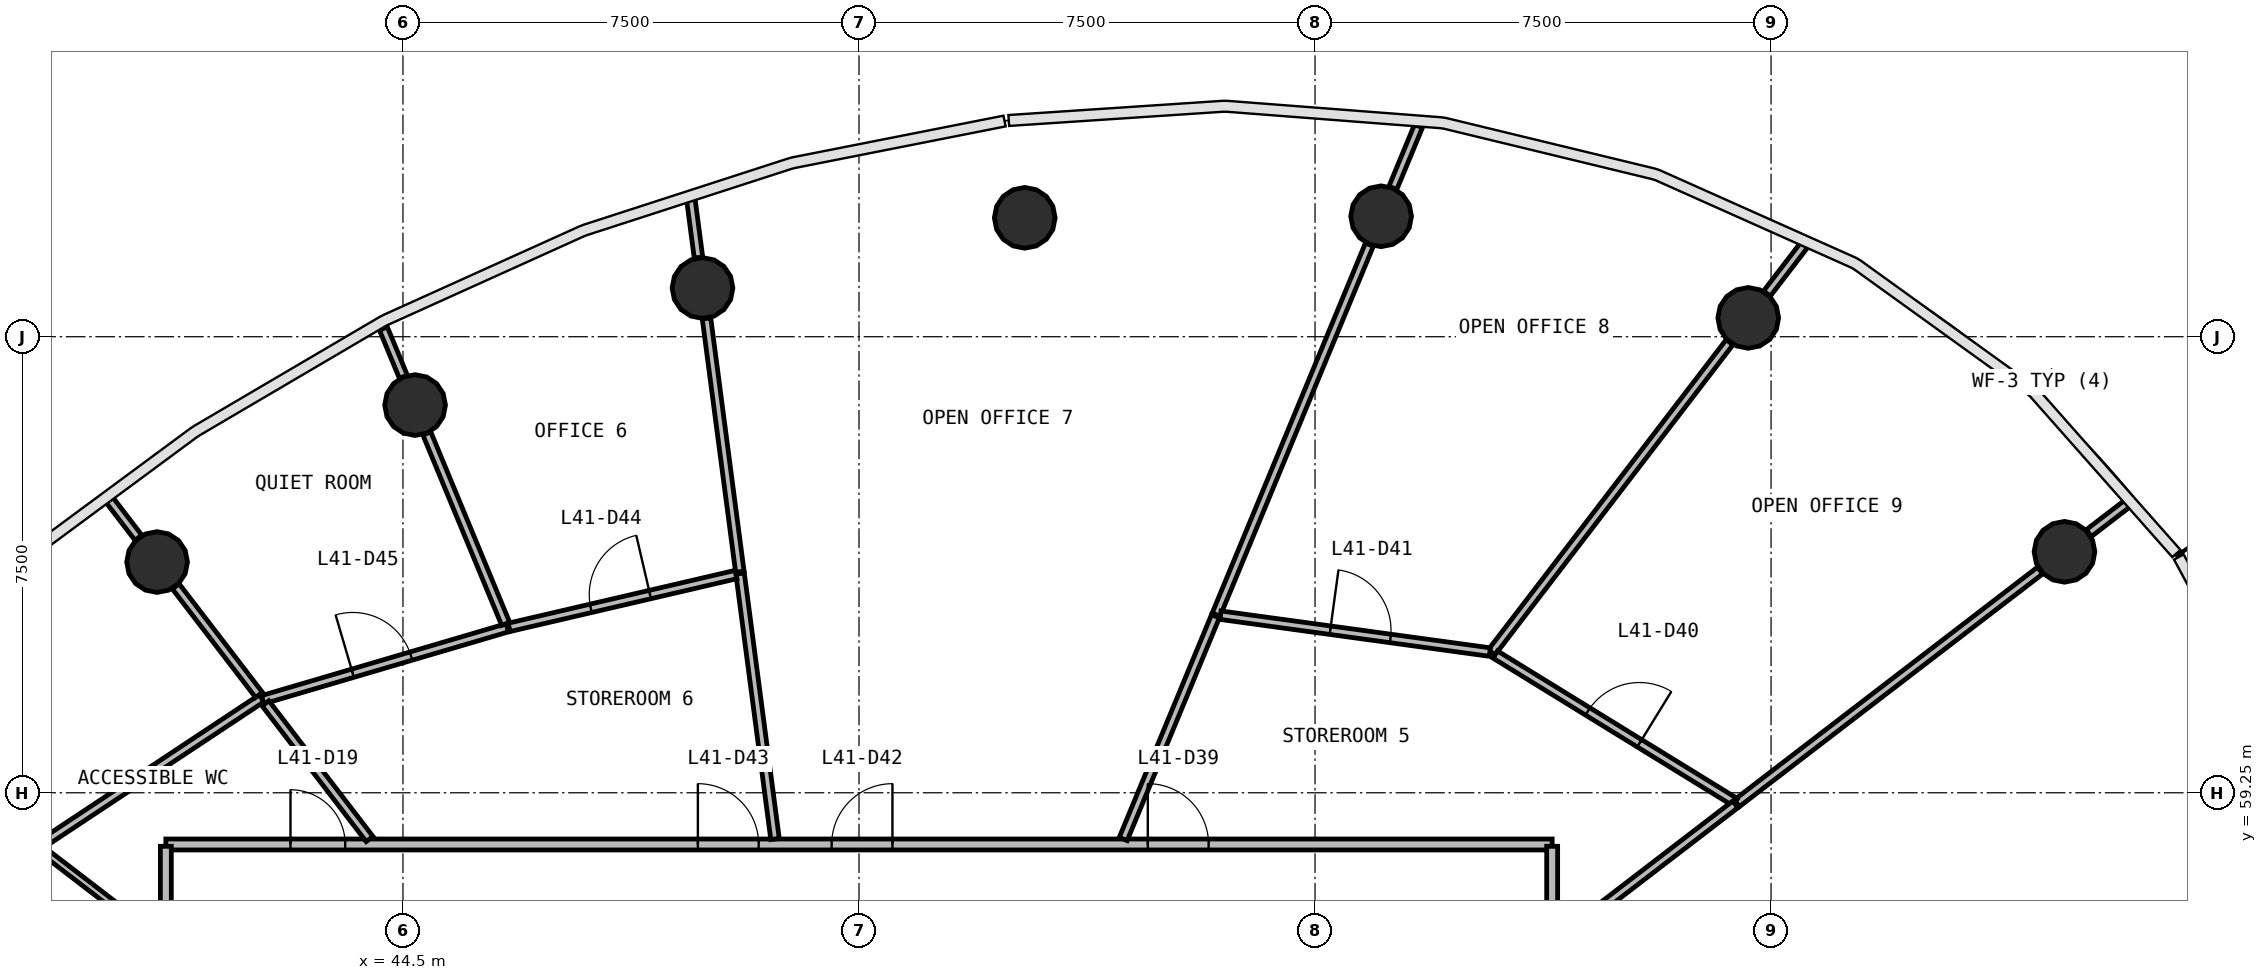
"""IFC4 building model, lengths in metres.
Left out: names, types, materials, properties, quantities, classifications, styles, units other than length and angle.
Written with IfcOpenShell. Run it as: python <this file> out.ifc"""

import sys

from ifc_helpers import new_model, si_unit, direction, frame, frame_2d, origin, origin_2d, place, context, subcontext, project, spatial, rectangle, circle, extrude, source, transform, mapped, element, fill, save


model = new_model("IFC4")
c1 = context("Model", 3, precision=1e-05, world=origin(), true_north=direction((0.0, 1.0)))
c2 = subcontext(c1, "Body", "Model", "MODEL_VIEW")
j1 = project(units=[si_unit("LENGTHUNIT", "METRE"), si_unit("PLANEANGLEUNIT", "RADIAN")], contexts=[c1])
p1 = place(None, origin())
s1 = spatial("IfcSite", under=j1, at=p1, CompositionType="ELEMENT")
p2 = place(p1, origin())
s2 = spatial("IfcBuilding", under=s1, at=p2, CompositionType="ELEMENT")
p3 = place(p2, frame((0.0, 0.0, 172.1)))
s3 = spatial("IfcBuildingStorey", under=s2, at=p3, CompositionType="ELEMENT", Elevation=172.1)
m1 = source(origin(), c2, "Body", "SweptSolid", [
    extrude(circle(Radius=0.5, at=origin_2d()), origin(), (0.0, 0.0, 1.0), 3.9),
])
for number, where, z_axis, x_axis in (
    (1, (71.826, 63.213, 0.0), (0.0, 0.0, 1.0), (1.0, 0.0, 0.0)),
    (2, (66.625, 67.06, 0.0), (0.0, 0.0, 1.0), (1.0, 0.0, 0.0)),
    (3, (60.587, 68.731, 0.0), (0.0, 0.0, 1.0), (1.0, 0.0, 0.0)),
    (4, (54.726, 68.705, 0.0), (0.0, 0.0, 1.0), (1.0, 0.0, 0.0)),
    (5, (49.426, 67.551, 0.0), (0.0, 0.0, 1.0), (1.0, 0.0, 0.0)),
    (6, (44.699, 65.626, 0.0), (0.0, 0.0, 1.0), (1.0, 0.0, 0.0)),
    (7, (40.456, 63.044, 0.0), (0.0, 0.0, 1.0), (1.0, 0.0, 0.0)),
):
    element("IfcColumn", number, at=place(p3, frame(where, z_axis=z_axis, x_axis=x_axis)), inside=s3, PredefinedType="COLUMN", context=c2, shape_type="MappedRepresentation", body=[
        mapped(m1, transform((0.0, 0.0, 0.0), scale=1.0)),
    ])
p4 = place(p3, frame((40.6, 58.4, 0.0), z_axis=(0.0, 0.0, 1.0), x_axis=(1.0, 0.0, 0.0)))
e8 = element("IfcWall", 8, at=p4, inside=s3, PredefinedType="PARTITIONING", context=c2, shape_type="SweptSolid", body=[
    extrude(rectangle(XDim=22.8, YDim=0.18, at=frame_2d((11.4, 0.0))), origin(), (0.0, 0.0, 1.0), 2.88),
])
p5 = place(p4, frame((2.05, 0.0, 0.0)))
e9 = element("IfcOpeningElement", 9, at=p5, cuts=e8, PredefinedType="OPENING", context=c2, shape_type="SweptSolid", body=[
    extrude(rectangle(XDim=0.9, YDim=2.1, at=frame_2d((0.45, 1.05))), frame((0.0, 0.1, 0.0), z_axis=(0.0, -1.0, 0.0), x_axis=(1.0, 0.0, 0.0)), (0.0, 0.0, 1.0), 0.2),
])
p6 = place(p4, frame((16.15, 0.0, 0.0)))
e10 = element("IfcOpeningElement", 10, at=p6, cuts=e8, PredefinedType="OPENING", context=c2, shape_type="SweptSolid", body=[
    extrude(rectangle(XDim=1.0, YDim=2.1, at=frame_2d((0.5, 1.05))), frame((0.0, 0.1, 0.0), z_axis=(0.0, -1.0, 0.0), x_axis=(1.0, 0.0, 0.0)), (0.0, 0.0, 1.0), 0.2),
])
p7 = place(p4, frame((10.95, 0.0, 0.0)))
e11 = element("IfcOpeningElement", 11, at=p7, cuts=e8, PredefinedType="OPENING", context=c2, shape_type="SweptSolid", body=[
    extrude(rectangle(XDim=1.0, YDim=2.1, at=frame_2d((0.5, 1.05))), frame((0.0, 0.1, 0.0), z_axis=(0.0, -1.0, 0.0), x_axis=(1.0, 0.0, 0.0)), (0.0, 0.0, 1.0), 0.2),
])
p8 = place(p4, frame((8.75, 0.0, 0.0)))
e12 = element("IfcOpeningElement", 12, at=p8, cuts=e8, PredefinedType="OPENING", context=c2, shape_type="SweptSolid", body=[
    extrude(rectangle(XDim=1.0, YDim=2.1, at=frame_2d((0.5, 1.05))), frame((0.0, 0.1, 0.0), z_axis=(0.0, -1.0, 0.0), x_axis=(1.0, 0.0, 0.0)), (0.0, 0.0, 1.0), 0.2),
])
p9 = place(p3, frame((63.4, 58.37, 0.0), z_axis=(0.0, 0.0, 1.0), x_axis=(0.0, -1.0, 0.0)))
e13 = element("IfcWall", 13, at=p9, inside=s3, PredefinedType="PARTITIONING", context=c2, shape_type="SweptSolid", body=[
    extrude(rectangle(XDim=20.74, YDim=0.18, at=frame_2d((10.37, 0.0))), origin(), (0.0, 0.0, 1.0), 2.88),
])
p10 = place(p9, frame((15.49, 0.0, 0.0)))
e14 = element("IfcOpeningElement", 14, at=p10, cuts=e13, PredefinedType="OPENING", context=c2, shape_type="SweptSolid", body=[
    extrude(rectangle(XDim=1.0, YDim=2.1, at=frame_2d((0.5, 1.05))), frame((0.0, 0.1, 0.0), z_axis=(0.0, -1.0, 0.0), x_axis=(1.0, 0.0, 0.0)), (0.0, 0.0, 1.0), 0.2),
])
p11 = place(p9, frame((9.89, 0.0, 0.0)))
e15 = element("IfcOpeningElement", 15, at=p11, cuts=e13, PredefinedType="OPENING", context=c2, shape_type="SweptSolid", body=[
    extrude(rectangle(XDim=1.0, YDim=2.1, at=frame_2d((0.5, 1.05))), frame((0.0, 0.1, 0.0), z_axis=(0.0, -1.0, 0.0), x_axis=(1.0, 0.0, 0.0)), (0.0, 0.0, 1.0), 0.2),
])
p12 = place(p9, frame((7.69, 0.0, 0.0)))
e16 = element("IfcOpeningElement", 16, at=p12, cuts=e13, PredefinedType="OPENING", context=c2, shape_type="SweptSolid", body=[
    extrude(rectangle(XDim=1.0, YDim=2.1, at=frame_2d((0.5, 1.05))), frame((0.0, 0.1, 0.0), z_axis=(0.0, -1.0, 0.0), x_axis=(1.0, 0.0, 0.0)), (0.0, 0.0, 1.0), 0.2),
])
p13 = place(p3, frame((40.6, 37.63, 0.0), z_axis=(0.0, 0.0, 1.0), x_axis=(0.0, 1.0, 0.0)))
e17 = element("IfcWall", 17, at=p13, inside=s3, PredefinedType="PARTITIONING", context=c2, shape_type="SweptSolid", body=[
    extrude(rectangle(XDim=20.74, YDim=0.18, at=frame_2d((10.37, 0.0))), origin(), (0.0, 0.0, 1.0), 2.88),
])
p14 = place(p13, frame((15.39, 0.0, 0.0)))
e18 = element("IfcOpeningElement", 18, at=p14, cuts=e17, PredefinedType="OPENING", context=c2, shape_type="SweptSolid", body=[
    extrude(rectangle(XDim=0.9, YDim=2.1, at=frame_2d((0.45, 1.05))), frame((0.0, 0.1, 0.0), z_axis=(0.0, -1.0, 0.0), x_axis=(1.0, 0.0, 0.0)), (0.0, 0.0, 1.0), 0.2),
])
p15 = place(p13, frame((9.89, 0.0, 0.0)))
e19 = element("IfcOpeningElement", 19, at=p15, cuts=e17, PredefinedType="OPENING", context=c2, shape_type="SweptSolid", body=[
    extrude(rectangle(XDim=1.0, YDim=2.1, at=frame_2d((0.5, 1.05))), frame((0.0, 0.1, 0.0), z_axis=(0.0, -1.0, 0.0), x_axis=(1.0, 0.0, 0.0)), (0.0, 0.0, 1.0), 0.2),
])
p16 = place(p3, frame((57.874, 62.18, 0.0), z_axis=(0.0, 0.0, 1.0), x_axis=(0.382677040964, 0.92388217989, 0.0)))
e20 = element("IfcWall", 20, at=p16, inside=s3, PredefinedType="PARTITIONING", context=c2, shape_type="SweptSolid", body=[
    extrude(rectangle(XDim=6.585, YDim=0.14, at=frame_2d((3.292, 0.0))), origin(), (0.0, 0.0, 1.0), 2.88),
])
p17 = place(p3, frame((62.405, 61.56, 0.0), z_axis=(0.0, 0.0, 1.0), x_axis=(0.608781538985, 0.793337908958, 0.0)))
e21 = element("IfcWall", 21, at=p17, inside=s3, PredefinedType="PARTITIONING", context=c2, shape_type="SweptSolid", body=[
    extrude(rectangle(XDim=6.428, YDim=0.14, at=frame_2d((3.214, 0.0))), origin(), (0.0, 0.0, 1.0), 2.88),
])
p18 = place(p3, frame((66.437, 59.078, 0.0), z_axis=(0.0, 0.0, 1.0), x_axis=(0.793368198418, 0.608742065032, 0.0)))
e22 = element("IfcWall", 22, at=p18, inside=s3, PredefinedType="PARTITIONING", context=c2, shape_type="SweptSolid", body=[
    extrude(rectangle(XDim=6.288, YDim=0.14, at=frame_2d((3.144, 0.0))), origin(), (0.0, 0.0, 1.0), 2.88),
])
p19 = place(p3, frame((62.465, 61.523, 0.0), z_axis=(0.0, 0.0, 1.0), x_axis=(0.851618521929, -0.524162086675, 0.0)))
e23 = element("IfcWall", 23, at=p19, inside=s3, PredefinedType="PARTITIONING", context=c2, shape_type="SweptSolid", body=[
    extrude(rectangle(XDim=4.635, YDim=0.14, at=frame_2d((2.317, 0.0))), origin(), (0.0, 0.0, 1.0), 2.88),
])
p20 = place(p19, frame((1.785, 0.0, 0.0)))
e24 = element("IfcOpeningElement", 24, at=p20, cuts=e23, PredefinedType="OPENING", context=c2, shape_type="SweptSolid", body=[
    extrude(rectangle(XDim=1.0, YDim=2.1, at=frame_2d((0.5, 1.05))), frame((0.0, 0.08, 0.0), z_axis=(0.0, -1.0, 0.0), x_axis=(1.0, 0.0, 0.0)), (0.0, 0.0, 1.0), 0.16),
])
p21 = place(p3, frame((57.946, 62.171, 0.0), z_axis=(0.0, 0.0, 1.0), x_axis=(0.990750915394, -0.135693123057, 0.0)))
e25 = element("IfcWall", 25, at=p21, inside=s3, PredefinedType="PARTITIONING", context=c2, shape_type="SweptSolid", body=[
    extrude(rectangle(XDim=4.471, YDim=0.14, at=frame_2d((2.235, 0.0))), origin(), (0.0, 0.0, 1.0), 2.88),
])
p22 = place(p21, frame((1.821, 0.0, 0.0)))
e26 = element("IfcOpeningElement", 26, at=p22, cuts=e25, PredefinedType="OPENING", context=c2, shape_type="SweptSolid", body=[
    extrude(rectangle(XDim=1.0, YDim=2.1, at=frame_2d((0.5, 1.05))), frame((0.0, 0.08, 0.0), z_axis=(0.0, -1.0, 0.0), x_axis=(1.0, 0.0, 0.0)), (0.0, 0.0, 1.0), 0.16),
])
p23 = place(p3, frame((50.619, 58.49, 0.0), z_axis=(0.0, 0.0, 1.0), x_axis=(-0.130550630931, 0.99144164365, 0.0)))
e27 = element("IfcWall", 27, at=p23, inside=s3, PredefinedType="PARTITIONING", context=c2, shape_type="SweptSolid", body=[
    extrude(rectangle(XDim=4.402, YDim=0.14, at=frame_2d((2.201, 0.0))), origin(), (0.0, 0.0, 1.0), 2.88),
])
p24 = place(p3, frame((42.175, 60.804, 0.0), z_axis=(0.0, 0.0, 1.0), x_axis=(-0.833696109899, -0.552223502162, 0.0)))
e28 = element("IfcWall", 28, at=p24, inside=s3, PredefinedType="PARTITIONING", context=c2, shape_type="SweptSolid", body=[
    extrude(rectangle(XDim=4.417, YDim=0.14, at=frame_2d((2.209, 0.0))), origin(), (0.0, 0.0, 1.0), 2.88),
])
p25 = place(p3, frame((50.04, 62.885, 0.0), z_axis=(0.0, 0.0, 1.0), x_axis=(-0.130474047821, 0.991451724919, 0.0)))
e29 = element("IfcWall", 29, at=p25, inside=s3, PredefinedType="PARTITIONING", context=c2, shape_type="SweptSolid", body=[
    extrude(rectangle(XDim=4.203, YDim=0.14, at=frame_2d((2.101, 0.0))), origin(), (0.0, 0.0, 1.0), 2.88),
])
p26 = place(p3, frame((42.193, 60.781, 0.0), z_axis=(0.0, 0.0, 1.0), x_axis=(0.959388676041, 0.282087518838, 0.0)))
e30 = element("IfcWall", 30, at=p26, inside=s3, PredefinedType="PARTITIONING", context=c2, shape_type="SweptSolid", body=[
    extrude(rectangle(XDim=4.193, YDim=0.14, at=frame_2d((2.097, 0.0))), origin(), (0.0, 0.0, 1.0), 2.88),
])
p27 = place(p26, frame((1.543, 0.0, 0.0)))
e31 = element("IfcOpeningElement", 31, at=p27, cuts=e30, PredefinedType="OPENING", context=c2, shape_type="SweptSolid", body=[
    extrude(rectangle(XDim=1.0, YDim=2.1, at=frame_2d((0.5, 1.05))), frame((0.0, 0.08, 0.0), z_axis=(0.0, -1.0, 0.0), x_axis=(1.0, 0.0, 0.0)), (0.0, 0.0, 1.0), 0.16),
])
p28 = place(p3, frame((56.345, 58.49, 0.0), z_axis=(0.0, 0.0, 1.0), x_axis=(0.382659985547, 0.923889244153, 0.0)))
e32 = element("IfcWall", 32, at=p28, inside=s3, PredefinedType="PARTITIONING", context=c2, shape_type="SweptSolid", body=[
    extrude(rectangle(XDim=3.965, YDim=0.14, at=frame_2d((1.982, 0.0))), origin(), (0.0, 0.0, 1.0), 2.88),
])
p29 = place(p3, frame((46.245, 61.97, 0.0), z_axis=(0.0, 0.0, 1.0), x_axis=(0.973958620347, 0.226725838519, 0.0)))
e33 = element("IfcWall", 33, at=p29, inside=s3, PredefinedType="PARTITIONING", context=c2, shape_type="SweptSolid", body=[
    extrude(rectangle(XDim=3.83, YDim=0.14, at=frame_2d((1.915, 0.0))), origin(), (0.0, 0.0, 1.0), 2.88),
])
p30 = place(p29, frame((1.38, 0.0, 0.0)))
e34 = element("IfcOpeningElement", 34, at=p30, cuts=e33, PredefinedType="OPENING", context=c2, shape_type="SweptSolid", body=[
    extrude(rectangle(XDim=1.0, YDim=2.1, at=frame_2d((0.5, 1.05))), frame((0.0, 0.08, 0.0), z_axis=(0.0, -1.0, 0.0), x_axis=(1.0, 0.0, 0.0)), (0.0, 0.0, 1.0), 0.16),
])
p31 = place(p3, frame((63.49, 56.817, 0.0), z_axis=(0.0, 0.0, 1.0), x_axis=(0.793352487639, 0.608762540206, 0.0)))
e35 = element("IfcWall", 35, at=p31, inside=s3, PredefinedType="PARTITIONING", context=c2, shape_type="SweptSolid", body=[
    extrude(rectangle(XDim=3.685, YDim=0.14, at=frame_2d((1.842, 0.0))), origin(), (0.0, 0.0, 1.0), 2.88),
])
p32 = place(p3, frame((46.189, 62.028, 0.0), z_axis=(0.0, 0.0, 1.0), x_axis=(-0.382691135874, 0.923876341576, 0.0)))
e36 = element("IfcWall", 36, at=p32, inside=s3, PredefinedType="PARTITIONING", context=c2, shape_type="SweptSolid", body=[
    extrude(rectangle(XDim=3.389, YDim=0.14, at=frame_2d((1.694, 0.0))), origin(), (0.0, 0.0, 1.0), 2.88),
])
p33 = place(p3, frame((43.951, 58.49, 0.0), z_axis=(0.0, 0.0, 1.0), x_axis=(-0.608715851353, 0.793388311177, 0.0)))
e37 = element("IfcWall", 37, at=p33, inside=s3, PredefinedType="PARTITIONING", context=c2, shape_type="SweptSolid", body=[
    extrude(rectangle(XDim=2.812, YDim=0.14, at=frame_2d((1.406, 0.0))), origin(), (0.0, 0.0, 1.0), 2.88),
])
p34 = place(p3, frame((42.132, 60.86, 0.0), z_axis=(0.0, 0.0, 1.0), x_axis=(-0.60873458163, 0.793373940288, 0.0)))
e38 = element("IfcWall", 38, at=p34, inside=s3, PredefinedType="PARTITIONING", context=c2, shape_type="SweptSolid", body=[
    extrude(rectangle(XDim=2.249, YDim=0.14, at=frame_2d((1.125, 0.0))), origin(), (0.0, 0.0, 1.0), 2.88),
])
p35 = place(p3, frame((60.78, 69.198, 0.0), z_axis=(0.0, 0.0, 1.0), x_axis=(0.382724096228, 0.923862687939, 0.0)))
e39 = element("IfcWall", 39, at=p35, inside=s3, PredefinedType="PARTITIONING", context=c2, shape_type="SweptSolid", body=[
    extrude(rectangle(XDim=1.1, YDim=0.14, at=frame_2d((0.55, 0.0))), origin(), (0.0, 0.0, 1.0), 2.88),
])
p36 = place(p3, frame((66.932, 67.46, 0.0), z_axis=(0.0, 0.0, 1.0), x_axis=(0.608710939512, 0.793392079692, 0.0)))
e40 = element("IfcWall", 40, at=p36, inside=s3, PredefinedType="PARTITIONING", context=c2, shape_type="SweptSolid", body=[
    extrude(rectangle(XDim=1.027, YDim=0.14, at=frame_2d((0.514, 0.0))), origin(), (0.0, 0.0, 1.0), 2.88),
])
p37 = place(p3, frame((49.36, 68.052, 0.0), z_axis=(0.0, 0.0, 1.0), x_axis=(-0.130303682633, 0.991474129916, 0.0)))
e41 = element("IfcWall", 41, at=p37, inside=s3, PredefinedType="PARTITIONING", context=c2, shape_type="SweptSolid", body=[
    extrude(rectangle(XDim=0.963, YDim=0.14, at=frame_2d((0.481, 0.0))), origin(), (0.0, 0.0, 1.0), 2.88),
])
p38 = place(p3, frame((44.506, 66.092, 0.0), z_axis=(0.0, 0.0, 1.0), x_axis=(-0.38261179702, 0.923909201589, 0.0)))
e42 = element("IfcWall", 42, at=p38, inside=s3, PredefinedType="PARTITIONING", context=c2, shape_type="SweptSolid", body=[
    extrude(rectangle(XDim=0.857, YDim=0.14, at=frame_2d((0.428, 0.0))), origin(), (0.0, 0.0, 1.0), 2.88),
])
p39 = place(p3, frame((72.226, 63.52, 0.0), z_axis=(0.0, 0.0, 1.0), x_axis=(0.793240633291, 0.608908283484, 0.0)))
e43 = element("IfcWall", 43, at=p39, inside=s3, PredefinedType="PARTITIONING", context=c2, shape_type="SweptSolid", body=[
    extrude(rectangle(XDim=0.838, YDim=0.14, at=frame_2d((0.419, 0.0))), origin(), (0.0, 0.0, 1.0), 2.88),
])
p40 = place(p3, frame((40.149, 63.445, 0.0), z_axis=(0.0, 0.0, 1.0), x_axis=(-0.60871867817, 0.793386142334, 0.0)))
e44 = element("IfcWall", 44, at=p40, inside=s3, PredefinedType="PARTITIONING", context=c2, shape_type="SweptSolid", body=[
    extrude(rectangle(XDim=0.785, YDim=0.14, at=frame_2d((0.393, 0.0))), origin(), (0.0, 0.0, 1.0), 2.88),
])
p41 = place(p3, frame((40.51, 56.817, 0.0), z_axis=(0.0, 0.0, 1.0), x_axis=(-0.79340260872, 0.608697215762, 0.0)))
e45 = element("IfcWall", 45, at=p41, inside=s3, PredefinedType="PARTITIONING", context=c2, shape_type="SweptSolid", body=[
    extrude(rectangle(XDim=2.469, YDim=0.12, at=frame_2d((1.234, 0.0))), origin(), (0.0, 0.0, 1.0), 2.88),
])
m2 = source(origin(), c2, "Body", "SweptSolid", [
    extrude(rectangle(XDim=0.9, YDim=2.1, at=frame_2d((0.45, 1.05))), frame((0.0, 0.025, 0.0), z_axis=(0.0, -1.0, 0.0), x_axis=(1.0, 0.0, 0.0)), (0.0, 0.0, 1.0), 0.05),
])
p42 = place(p5, origin())
e46 = element("IfcDoor", 46, at=p42, inside=s3, OperationType="SINGLE_SWING_LEFT", PredefinedType="DOOR", context=c2, shape_type="MappedRepresentation", body=[
    mapped(m2, transform((0.0, 0.0, 0.0), scale=1.0)),
])
fill(e9, e46)
m3 = source(origin(), c2, "Body", "SweptSolid", [
    extrude(rectangle(XDim=1.0, YDim=2.1, at=frame_2d((0.5, 1.05))), frame((0.0, 0.025, 0.0), z_axis=(0.0, -1.0, 0.0), x_axis=(1.0, 0.0, 0.0)), (0.0, 0.0, 1.0), 0.05),
])
p43 = place(p6, origin())
e47 = element("IfcDoor", 47, at=p43, inside=s3, OperationType="SINGLE_SWING_LEFT", PredefinedType="DOOR", context=c2, shape_type="MappedRepresentation", body=[
    mapped(m3, transform((0.0, 0.0, 0.0), scale=1.0)),
])
fill(e10, e47)
p44 = place(p20, origin())
e48 = element("IfcDoor", 48, at=p44, inside=s3, OperationType="SINGLE_SWING_RIGHT", PredefinedType="DOOR", context=c2, shape_type="MappedRepresentation", body=[
    mapped(m3, transform((0.0, 0.0, 0.0), scale=1.0)),
])
fill(e24, e48)
p45 = place(p22, origin())
e49 = element("IfcDoor", 49, at=p45, inside=s3, OperationType="SINGLE_SWING_LEFT", PredefinedType="DOOR", context=c2, shape_type="MappedRepresentation", body=[
    mapped(m3, transform((0.0, 0.0, 0.0), scale=1.0)),
])
fill(e26, e49)
p46 = place(p7, origin())
e50 = element("IfcDoor", 50, at=p46, inside=s3, OperationType="SINGLE_SWING_RIGHT", PredefinedType="DOOR", context=c2, shape_type="MappedRepresentation", body=[
    mapped(m3, transform((0.0, 0.0, 0.0), scale=1.0)),
])
fill(e11, e50)
p47 = place(p8, origin())
e51 = element("IfcDoor", 51, at=p47, inside=s3, OperationType="SINGLE_SWING_LEFT", PredefinedType="DOOR", context=c2, shape_type="MappedRepresentation", body=[
    mapped(m3, transform((0.0, 0.0, 0.0), scale=1.0)),
])
fill(e12, e51)
p48 = place(p30, origin())
e52 = element("IfcDoor", 52, at=p48, inside=s3, OperationType="SINGLE_SWING_RIGHT", PredefinedType="DOOR", context=c2, shape_type="MappedRepresentation", body=[
    mapped(m3, transform((0.0, 0.0, 0.0), scale=1.0)),
])
fill(e34, e52)
p49 = place(p27, origin())
e53 = element("IfcDoor", 53, at=p49, inside=s3, OperationType="SINGLE_SWING_LEFT", PredefinedType="DOOR", context=c2, shape_type="MappedRepresentation", body=[
    mapped(m3, transform((0.0, 0.0, 0.0), scale=1.0)),
])
fill(e31, e53)
save(model, sys.argv[1])
